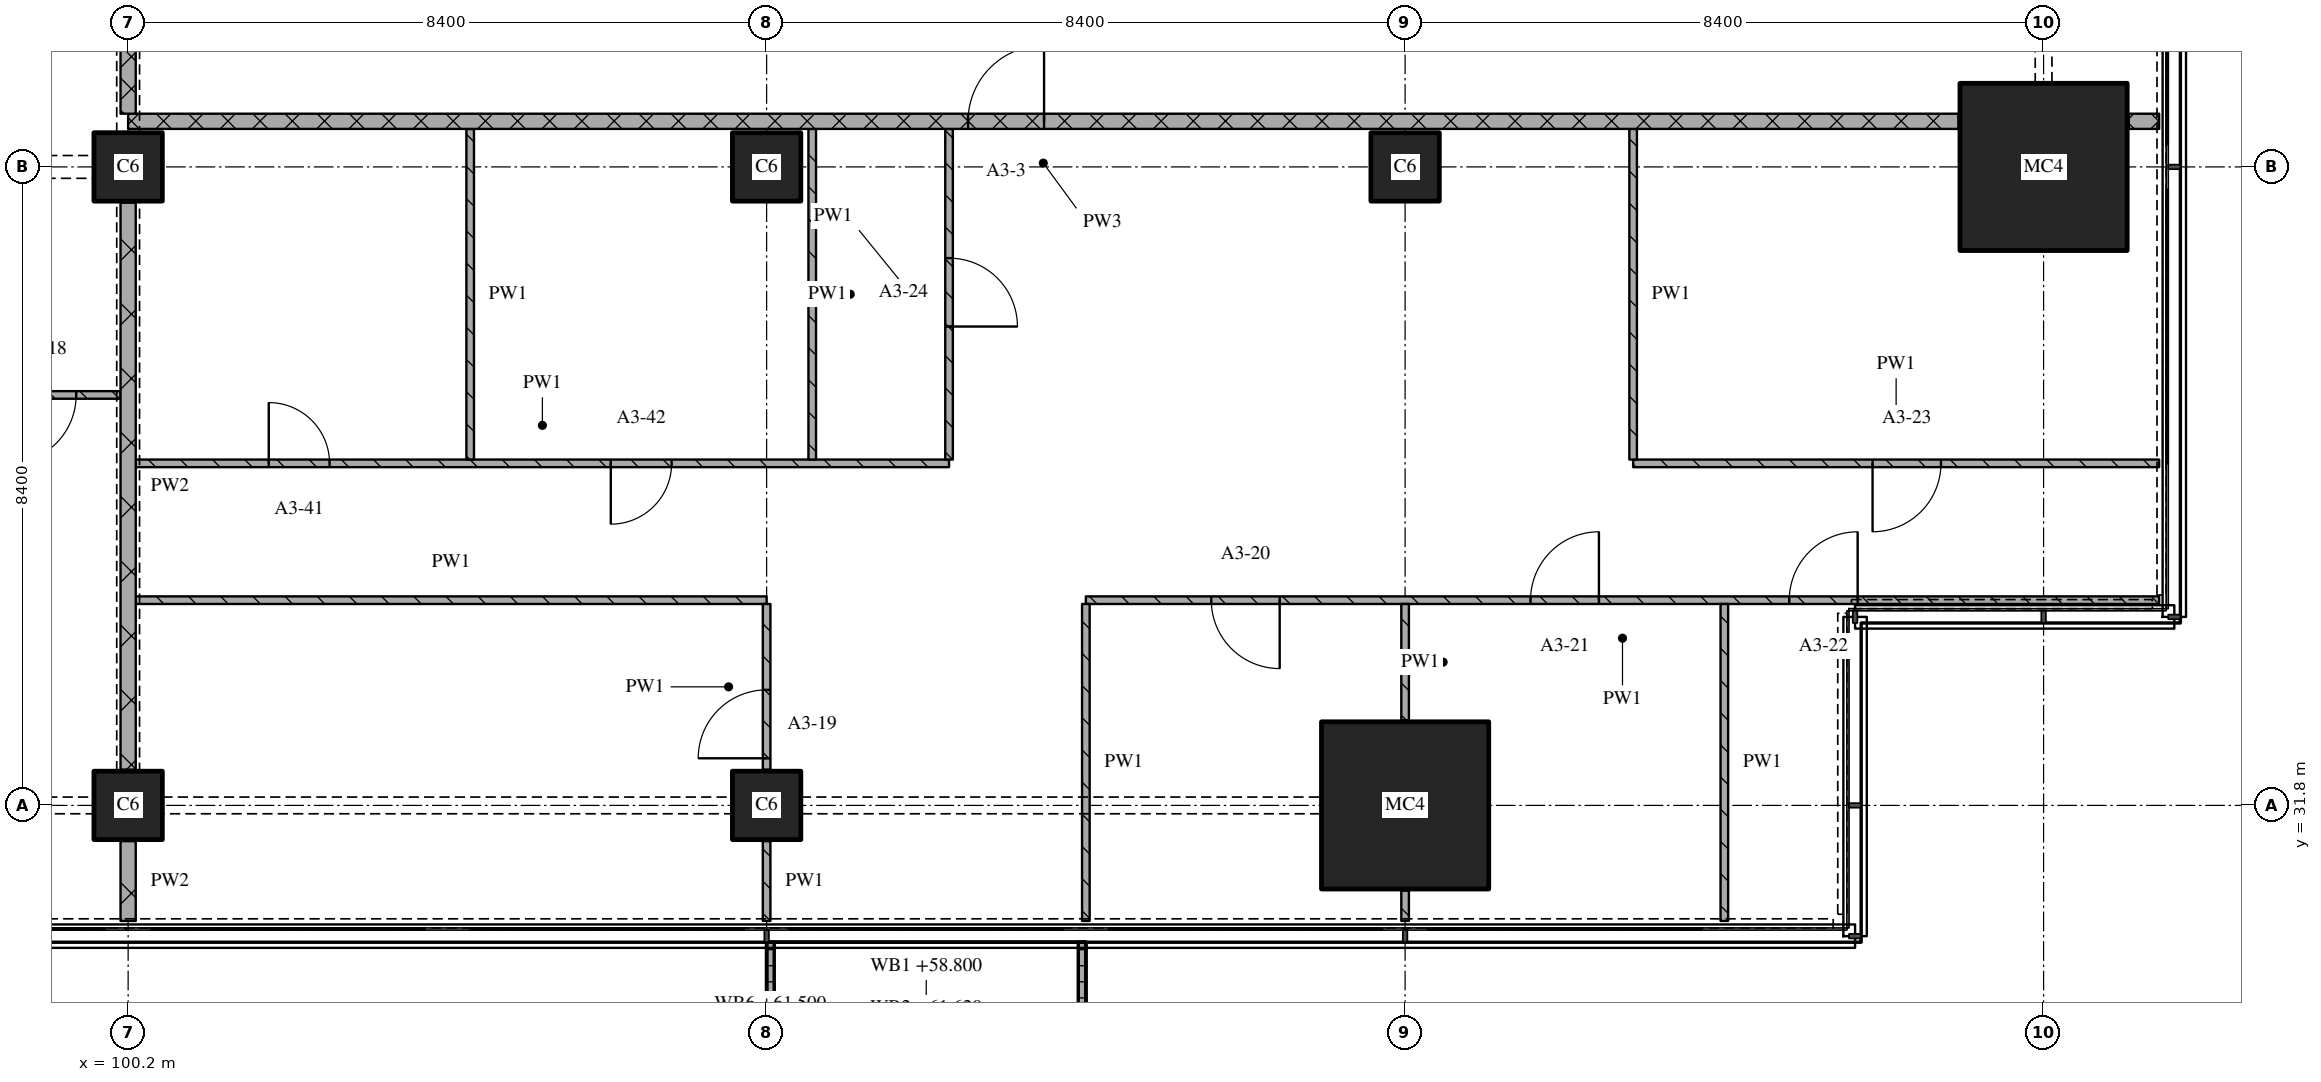
"""IFC4 building model, lengths in metres.
Left out: names, types, materials, properties, quantities, classifications, styles, units other than length and angle.
Written with IfcOpenShell. Run it as: python <this file> out.ifc"""

import sys

from ifc_helpers import new_model, si_unit, direction, frame, frame_2d, origin, origin_2d, place, context, subcontext, project, spatial, polyline, rectangle, outline, extrude, element, fill, save


model = new_model("IFC4")
c1 = context("Model", 3, precision=1e-05, world=origin(), true_north=direction((0.0, 1.0)))
c2 = subcontext(c1, "Body", "Model", "MODEL_VIEW")
j1 = project(units=[si_unit("LENGTHUNIT", "METRE"), si_unit("PLANEANGLEUNIT", "RADIAN")], contexts=[c1])
p1 = place(None, origin())
s1 = spatial("IfcSite", under=j1, at=p1, CompositionType="ELEMENT")
p2 = place(p1, origin())
s2 = spatial("IfcBuilding", under=s1, at=p2, CompositionType="ELEMENT")
p3 = place(p2, frame((0.0, 0.0, 58.8)))
s3 = spatial("IfcBuildingStorey", under=s2, at=p3, CompositionType="ELEMENT", Elevation=58.8)
for number, where, z_axis, x_axis in (
    (1, (100.2, 31.8, 0.0), (0.0, 0.0, 1.0), (1.0, 0.0, 0.0)),
    (2, (100.2, 40.2, 0.0), (0.0, 0.0, 1.0), (1.0, 0.0, 0.0)),
    (3, (108.6, 31.8, 0.0), (0.0, 0.0, 1.0), (1.0, 0.0, 0.0)),
    (4, (108.6, 40.2, 0.0), (0.0, 0.0, 1.0), (1.0, 0.0, 0.0)),
):
    element("IfcColumn", number, at=place(p3, frame(where, z_axis=z_axis, x_axis=x_axis)), inside=s3, PredefinedType="COLUMN", context=c2, shape_type="SweptSolid", body=[
        extrude(rectangle(XDim=0.9, YDim=0.9, at=origin_2d()), origin(), (0.0, 0.0, 1.0), 3.6),
    ])
p4 = place(p3, frame((117.0, 31.8, 0.0), z_axis=(0.0, 0.0, 1.0), x_axis=(1.0, 0.0, 0.0)))
e5 = element("IfcColumn", 5, at=p4, inside=s3, PredefinedType="COLUMN", context=c2, shape_type="SweptSolid", body=[
    extrude(rectangle(XDim=2.2, YDim=2.2, at=origin_2d()), origin(), (0.0, 0.0, 1.0), 3.6),
])
p5 = place(p3, frame((117.0, 40.2, 0.0), z_axis=(0.0, 0.0, 1.0), x_axis=(1.0, 0.0, 0.0)))
e6 = element("IfcColumn", 6, at=p5, inside=s3, PredefinedType="COLUMN", context=c2, shape_type="SweptSolid", body=[
    extrude(rectangle(XDim=0.9, YDim=0.9, at=origin_2d()), origin(), (0.0, 0.0, 1.0), 3.6),
])
p6 = place(p3, frame((125.4, 40.2, 0.0), z_axis=(0.0, 0.0, 1.0), x_axis=(1.0, 0.0, 0.0)))
e7 = element("IfcColumn", 7, at=p6, inside=s3, PredefinedType="COLUMN", context=c2, shape_type="SweptSolid", body=[
    extrude(rectangle(XDim=2.2, YDim=2.2, at=origin_2d()), origin(), (0.0, 0.0, 1.0), 3.6),
])
p7 = place(p3, origin())
e8 = element("IfcWall", 8, at=p7, inside=s3, PredefinedType="SOLIDWALL", context=c2, shape_type="SweptSolid", body=[
    extrude(outline(polyline([(108.6, 30.0), (108.7, 30.0), (108.7, 28.367), (112.7, 28.367), (112.7, 30.0), (112.8, 30.0), (112.8, 28.267), (108.6, 28.267), (108.6, 30.0)])), origin(), (0.0, 0.0, 1.0), 1.0),
])
p8 = place(p3, frame((100.3, 34.5, 0.0), z_axis=(0.0, 0.0, 1.0), x_axis=(1.0, 0.0, 0.0)))
e9 = element("IfcWall", 9, at=p8, inside=s3, PredefinedType="PARTITIONING", context=c2, shape_type="SweptSolid", body=[
    extrude(rectangle(XDim=8.3, YDim=0.1, at=frame_2d((4.15, 0.0))), origin(), (0.0, 0.0, 1.0), 3.32),
])
p9 = place(p3, frame((126.92, 34.5, 0.0), z_axis=(0.0, 0.0, 1.0), x_axis=(-1.0, 0.0, 0.0)))
e10 = element("IfcWall", 10, at=p9, inside=s3, PredefinedType="PARTITIONING", context=c2, shape_type="SweptSolid", body=[
    extrude(rectangle(XDim=14.12, YDim=0.1, at=frame_2d((7.06, 0.0))), origin(), (0.0, 0.0, 1.0), 3.32),
])
p10 = place(p9, frame((3.966, 0.0, 0.0)))
e11 = element("IfcOpeningElement", 11, at=p10, cuts=e10, PredefinedType="OPENING", context=c2, shape_type="SweptSolid", body=[
    extrude(rectangle(XDim=0.9, YDim=2.1, at=frame_2d((0.45, 1.05))), frame((0.0, 0.06, 0.0), z_axis=(0.0, -1.0, 0.0), x_axis=(1.0, 0.0, 0.0)), (0.0, 0.0, 1.0), 0.12),
])
p11 = place(p9, frame((7.37, 0.0, 0.0)))
e12 = element("IfcOpeningElement", 12, at=p11, cuts=e10, PredefinedType="OPENING", context=c2, shape_type="SweptSolid", body=[
    extrude(rectangle(XDim=0.9, YDim=2.1, at=frame_2d((0.45, 1.05))), frame((0.0, 0.06, 0.0), z_axis=(0.0, -1.0, 0.0), x_axis=(1.0, 0.0, 0.0)), (0.0, 0.0, 1.0), 0.12),
])
p12 = place(p9, frame((11.57, 0.0, 0.0)))
e13 = element("IfcOpeningElement", 13, at=p12, cuts=e10, PredefinedType="OPENING", context=c2, shape_type="SweptSolid", body=[
    extrude(rectangle(XDim=0.9, YDim=2.1, at=frame_2d((0.45, 1.05))), frame((0.0, 0.06, 0.0), z_axis=(0.0, -1.0, 0.0), x_axis=(1.0, 0.0, 0.0)), (0.0, 0.0, 1.0), 0.12),
])
p13 = place(p3, frame((100.3, 36.3, 0.0), z_axis=(0.0, 0.0, 1.0), x_axis=(1.0, 0.0, 0.0)))
e14 = element("IfcWall", 14, at=p13, inside=s3, PredefinedType="PARTITIONING", context=c2, shape_type="SweptSolid", body=[
    extrude(rectangle(XDim=10.7, YDim=0.1, at=frame_2d((5.35, 0.0))), origin(), (0.0, 0.0, 1.0), 3.32),
])
p14 = place(p13, frame((1.75, 0.0, 0.0)))
e15 = element("IfcOpeningElement", 15, at=p14, cuts=e14, PredefinedType="OPENING", context=c2, shape_type="SweptSolid", body=[
    extrude(rectangle(XDim=0.8, YDim=2.1, at=frame_2d((0.4, 1.05))), frame((0.0, 0.06, 0.0), z_axis=(0.0, -1.0, 0.0), x_axis=(1.0, 0.0, 0.0)), (0.0, 0.0, 1.0), 0.12),
])
p15 = place(p13, frame((6.25, 0.0, 0.0)))
e16 = element("IfcOpeningElement", 16, at=p15, cuts=e14, PredefinedType="OPENING", context=c2, shape_type="SweptSolid", body=[
    extrude(rectangle(XDim=0.8, YDim=2.1, at=frame_2d((0.4, 1.05))), frame((0.0, 0.06, 0.0), z_axis=(0.0, -1.0, 0.0), x_axis=(1.0, 0.0, 0.0)), (0.0, 0.0, 1.0), 0.12),
])
p16 = place(p3, frame((120.0, 36.3, 0.0), z_axis=(0.0, 0.0, 1.0), x_axis=(1.0, 0.0, 0.0)))
e17 = element("IfcWall", 17, at=p16, inside=s3, PredefinedType="PARTITIONING", context=c2, shape_type="SweptSolid", body=[
    extrude(rectangle(XDim=6.92, YDim=0.1, at=frame_2d((3.46, 0.0))), origin(), (0.0, 0.0, 1.0), 3.32),
])
p17 = place(p16, frame((3.15, 0.0, 0.0)))
e18 = element("IfcOpeningElement", 18, at=p17, cuts=e17, PredefinedType="OPENING", context=c2, shape_type="SweptSolid", body=[
    extrude(rectangle(XDim=0.9, YDim=2.1, at=frame_2d((0.45, 1.05))), frame((0.0, 0.06, 0.0), z_axis=(0.0, -1.0, 0.0), x_axis=(1.0, 0.0, 0.0)), (0.0, 0.0, 1.0), 0.12),
])
p18 = place(p3, frame((89.1, 37.2, 0.0), z_axis=(0.0, 0.0, 1.0), x_axis=(1.0, 0.0, 0.0)))
e19 = element("IfcWall", 19, at=p18, inside=s3, PredefinedType="PARTITIONING", context=c2, shape_type="SweptSolid", body=[
    extrude(rectangle(XDim=11.0, YDim=0.1, at=frame_2d((5.5, 0.0))), origin(), (0.0, 0.0, 1.0), 3.32),
])
p19 = place(p18, frame((6.225, 0.0, 0.0)))
e20 = element("IfcOpeningElement", 20, at=p19, cuts=e19, PredefinedType="OPENING", context=c2, shape_type="SweptSolid", body=[
    extrude(rectangle(XDim=0.8, YDim=2.1, at=frame_2d((0.4, 1.05))), frame((0.0, 0.06, 0.0), z_axis=(0.0, -1.0, 0.0), x_axis=(1.0, 0.0, 0.0)), (0.0, 0.0, 1.0), 0.12),
])
p20 = place(p18, frame((9.517, 0.0, 0.0)))
e21 = element("IfcOpeningElement", 21, at=p20, cuts=e19, PredefinedType="OPENING", context=c2, shape_type="SweptSolid", body=[
    extrude(rectangle(XDim=0.9, YDim=2.1, at=frame_2d((0.45, 1.05))), frame((0.0, 0.06, 0.0), z_axis=(0.0, -1.0, 0.0), x_axis=(1.0, 0.0, 0.0)), (0.0, 0.0, 1.0), 0.12),
])
p21 = place(p3, frame((124.28, 40.8, 0.0), z_axis=(0.0, 0.0, 1.0), x_axis=(-1.0, 0.0, 0.0)))
e22 = element("IfcWall", 22, at=p21, inside=s3, PredefinedType="PARTITIONING", context=c2, shape_type="SweptSolid", body=[
    extrude(rectangle(XDim=24.08, YDim=0.2, at=frame_2d((12.04, 0.0))), origin(), (0.0, 0.0, 1.0), 3.32),
])
p22 = place(p21, frame((12.03, 0.0, 0.0)))
e23 = element("IfcOpeningElement", 23, at=p22, cuts=e22, PredefinedType="OPENING", context=c2, shape_type="SweptSolid", body=[
    extrude(rectangle(XDim=1.0, YDim=2.1, at=frame_2d((0.5, 1.05))), frame((0.0, 0.11, 0.0), z_axis=(0.0, -1.0, 0.0), x_axis=(1.0, 0.0, 0.0)), (0.0, 0.0, 1.0), 0.22),
])
p23 = place(p3, frame((126.52, 40.8, 0.0), z_axis=(0.0, 0.0, 1.0), x_axis=(1.0, 0.0, 0.0)))
e24 = element("IfcWall", 24, at=p23, inside=s3, PredefinedType="PARTITIONING", context=c2, shape_type="SweptSolid", body=[
    extrude(rectangle(XDim=0.4, YDim=0.2, at=frame_2d((0.2, 0.0))), origin(), (0.0, 0.0, 1.0), 3.32),
])
p24 = place(p3, frame((100.2, 43.1, 0.0), z_axis=(0.0, 0.0, 1.0), x_axis=(0.0, -1.0, 0.0)))
e25 = element("IfcWall", 25, at=p24, inside=s3, PredefinedType="PARTITIONING", context=c2, shape_type="SweptSolid", body=[
    extrude(rectangle(XDim=2.2, YDim=0.2, at=frame_2d((1.1, 0.0))), origin(), (0.0, 0.0, 1.0), 2.43),
])
p25 = place(p3, frame((100.2, 31.33, 0.0), z_axis=(0.0, 0.0, 1.0), x_axis=(0.0, -1.0, 0.0)))
e26 = element("IfcWall", 26, at=p25, inside=s3, PredefinedType="PARTITIONING", context=c2, shape_type="SweptSolid", body=[
    extrude(rectangle(XDim=1.05, YDim=0.2, at=frame_2d((0.525, 0.0))), origin(), (0.0, 0.0, 1.0), 3.32),
])
p26 = place(p3, frame((100.2, 39.73, 0.0), z_axis=(0.0, 0.0, 1.0), x_axis=(0.0, -1.0, 0.0)))
e27 = element("IfcWall", 27, at=p26, inside=s3, PredefinedType="PARTITIONING", context=c2, shape_type="SweptSolid", body=[
    extrude(rectangle(XDim=7.46, YDim=0.2, at=frame_2d((3.73, 0.0))), origin(), (0.0, 0.0, 1.0), 2.83),
])
p27 = place(p3, frame((104.7, 40.7, 0.0), z_axis=(0.0, 0.0, 1.0), x_axis=(0.0, -1.0, 0.0)))
e28 = element("IfcWall", 28, at=p27, inside=s3, PredefinedType="PARTITIONING", context=c2, shape_type="SweptSolid", body=[
    extrude(rectangle(XDim=4.35, YDim=0.1, at=frame_2d((2.175, 0.0))), origin(), (0.0, 0.0, 1.0), 3.32),
])
p28 = place(p3, frame((108.6, 31.33, 0.0), z_axis=(0.0, 0.0, 1.0), x_axis=(0.0, -1.0, 0.0)))
e29 = element("IfcWall", 29, at=p28, inside=s3, PredefinedType="PARTITIONING", context=c2, shape_type="SweptSolid", body=[
    extrude(rectangle(XDim=1.05, YDim=0.1, at=frame_2d((0.525, 0.0))), origin(), (0.0, 0.0, 1.0), 3.32),
])
p29 = place(p3, frame((108.6, 32.27, 0.0), z_axis=(0.0, 0.0, 1.0), x_axis=(0.0, 1.0, 0.0)))
e30 = element("IfcWall", 30, at=p29, inside=s3, PredefinedType="PARTITIONING", context=c2, shape_type="SweptSolid", body=[
    extrude(rectangle(XDim=2.18, YDim=0.1, at=frame_2d((1.09, 0.0))), origin(), (0.0, 0.0, 1.0), 3.32),
])
p30 = place(p29, frame((0.15, 0.0, 0.0)))
e31 = element("IfcOpeningElement", 31, at=p30, cuts=e30, PredefinedType="OPENING", context=c2, shape_type="SweptSolid", body=[
    extrude(rectangle(XDim=0.9, YDim=2.1, at=frame_2d((0.45, 1.05))), frame((0.0, 0.06, 0.0), z_axis=(0.0, -1.0, 0.0), x_axis=(1.0, 0.0, 0.0)), (0.0, 0.0, 1.0), 0.12),
])
p31 = place(p3, frame((109.2, 40.7, 0.0), z_axis=(0.0, 0.0, 1.0), x_axis=(0.0, -1.0, 0.0)))
e32 = element("IfcWall", 32, at=p31, inside=s3, PredefinedType="PARTITIONING", context=c2, shape_type="SweptSolid", body=[
    extrude(rectangle(XDim=4.35, YDim=0.1, at=frame_2d((2.175, 0.0))), origin(), (0.0, 0.0, 1.0), 3.32),
])
p32 = place(p3, frame((111.0, 36.35, 0.0), z_axis=(0.0, 0.0, 1.0), x_axis=(0.0, 1.0, 0.0)))
e33 = element("IfcWall", 33, at=p32, inside=s3, PredefinedType="PARTITIONING", context=c2, shape_type="SweptSolid", body=[
    extrude(rectangle(XDim=4.35, YDim=0.1, at=frame_2d((2.175, 0.0))), origin(), (0.0, 0.0, 1.0), 3.32),
])
p33 = place(p32, frame((1.75, 0.0, 0.0)))
e34 = element("IfcOpeningElement", 34, at=p33, cuts=e33, PredefinedType="OPENING", context=c2, shape_type="SweptSolid", body=[
    extrude(rectangle(XDim=0.9, YDim=2.1, at=frame_2d((0.45, 1.05))), frame((0.0, 0.06, 0.0), z_axis=(0.0, -1.0, 0.0), x_axis=(1.0, 0.0, 0.0)), (0.0, 0.0, 1.0), 0.12),
])
p34 = place(p3, frame((112.8, 34.45, 0.0), z_axis=(0.0, 0.0, 1.0), x_axis=(0.0, -1.0, 0.0)))
e35 = element("IfcWall", 35, at=p34, inside=s3, PredefinedType="PARTITIONING", context=c2, shape_type="SweptSolid", body=[
    extrude(rectangle(XDim=4.17, YDim=0.1, at=frame_2d((2.085, 0.0))), origin(), (0.0, 0.0, 1.0), 3.32),
])
p35 = place(p3, frame((117.0, 30.68, 0.0), z_axis=(0.0, 0.0, 1.0), x_axis=(0.0, -1.0, 0.0)))
e36 = element("IfcWall", 36, at=p35, inside=s3, PredefinedType="PARTITIONING", context=c2, shape_type="SweptSolid", body=[
    extrude(rectangle(XDim=0.4, YDim=0.1, at=frame_2d((0.2, 0.0))), origin(), (0.0, 0.0, 1.0), 3.32),
])
p36 = place(p3, frame((117.0, 34.45, 0.0), z_axis=(0.0, 0.0, 1.0), x_axis=(0.0, -1.0, 0.0)))
e37 = element("IfcWall", 37, at=p36, inside=s3, PredefinedType="PARTITIONING", context=c2, shape_type="SweptSolid", body=[
    extrude(rectangle(XDim=1.53, YDim=0.1, at=frame_2d((0.765, 0.0))), origin(), (0.0, 0.0, 1.0), 3.32),
])
p37 = place(p3, frame((120.0, 40.7, 0.0), z_axis=(0.0, 0.0, 1.0), x_axis=(0.0, -1.0, 0.0)))
e38 = element("IfcWall", 38, at=p37, inside=s3, PredefinedType="PARTITIONING", context=c2, shape_type="SweptSolid", body=[
    extrude(rectangle(XDim=4.35, YDim=0.1, at=frame_2d((2.175, 0.0))), origin(), (0.0, 0.0, 1.0), 3.32),
])
p38 = place(p3, frame((121.2, 34.45, 0.0), z_axis=(0.0, 0.0, 1.0), x_axis=(0.0, -1.0, 0.0)))
e39 = element("IfcWall", 39, at=p38, inside=s3, PredefinedType="PARTITIONING", context=c2, shape_type="SweptSolid", body=[
    extrude(rectangle(XDim=4.17, YDim=0.1, at=frame_2d((2.085, 0.0))), origin(), (0.0, 0.0, 1.0), 3.32),
])
p39 = place(p10, origin())
e40 = element("IfcDoor", 40, at=p39, inside=s3, OperationType="SINGLE_SWING_RIGHT", PredefinedType="DOOR", context=c2, shape_type="SweptSolid", body=[
    extrude(rectangle(XDim=0.9, YDim=2.1, at=frame_2d((0.45, 1.05))), frame((0.0, 0.025, 0.0), z_axis=(0.0, -1.0, 0.0), x_axis=(1.0, 0.0, 0.0)), (0.0, 0.0, 1.0), 0.05),
])
fill(e11, e40)
p40 = place(p11, origin())
e41 = element("IfcDoor", 41, at=p40, inside=s3, OperationType="SINGLE_SWING_RIGHT", PredefinedType="DOOR", context=c2, shape_type="SweptSolid", body=[
    extrude(rectangle(XDim=0.9, YDim=2.1, at=frame_2d((0.45, 1.05))), frame((0.0, 0.025, 0.0), z_axis=(0.0, -1.0, 0.0), x_axis=(1.0, 0.0, 0.0)), (0.0, 0.0, 1.0), 0.05),
])
fill(e12, e41)
p41 = place(p12, origin())
e42 = element("IfcDoor", 42, at=p41, inside=s3, OperationType="SINGLE_SWING_LEFT", PredefinedType="DOOR", context=c2, shape_type="SweptSolid", body=[
    extrude(rectangle(XDim=0.9, YDim=2.1, at=frame_2d((0.45, 1.05))), frame((0.0, 0.025, 0.0), z_axis=(0.0, -1.0, 0.0), x_axis=(1.0, 0.0, 0.0)), (0.0, 0.0, 1.0), 0.05),
])
fill(e13, e42)
p42 = place(p14, origin())
e43 = element("IfcDoor", 43, at=p42, inside=s3, OperationType="SINGLE_SWING_LEFT", PredefinedType="DOOR", context=c2, shape_type="SweptSolid", body=[
    extrude(rectangle(XDim=0.8, YDim=2.1, at=frame_2d((0.4, 1.05))), frame((0.0, 0.025, 0.0), z_axis=(0.0, -1.0, 0.0), x_axis=(1.0, 0.0, 0.0)), (0.0, 0.0, 1.0), 0.05),
])
fill(e15, e43)
p43 = place(p15, origin())
e44 = element("IfcDoor", 44, at=p43, inside=s3, OperationType="SINGLE_SWING_RIGHT", PredefinedType="DOOR", context=c2, shape_type="SweptSolid", body=[
    extrude(rectangle(XDim=0.8, YDim=2.1, at=frame_2d((0.4, 1.05))), frame((0.0, 0.025, 0.0), z_axis=(0.0, -1.0, 0.0), x_axis=(1.0, 0.0, 0.0)), (0.0, 0.0, 1.0), 0.05),
])
fill(e16, e44)
p44 = place(p17, origin())
e45 = element("IfcDoor", 45, at=p44, inside=s3, OperationType="SINGLE_SWING_RIGHT", PredefinedType="DOOR", context=c2, shape_type="SweptSolid", body=[
    extrude(rectangle(XDim=0.9, YDim=2.1, at=frame_2d((0.45, 1.05))), frame((0.0, 0.025, 0.0), z_axis=(0.0, -1.0, 0.0), x_axis=(1.0, 0.0, 0.0)), (0.0, 0.0, 1.0), 0.05),
])
fill(e18, e45)
p45 = place(p20, origin())
e46 = element("IfcDoor", 46, at=p45, inside=s3, OperationType="SINGLE_SWING_RIGHT", PredefinedType="DOOR", context=c2, shape_type="SweptSolid", body=[
    extrude(rectangle(XDim=0.9, YDim=2.1, at=frame_2d((0.45, 1.05))), frame((0.0, 0.025, 0.0), z_axis=(0.0, -1.0, 0.0), x_axis=(1.0, 0.0, 0.0)), (0.0, 0.0, 1.0), 0.05),
])
fill(e21, e46)
p46 = place(p22, origin())
e47 = element("IfcDoor", 47, at=p46, inside=s3, OperationType="SINGLE_SWING_RIGHT", PredefinedType="DOOR", context=c2, shape_type="SweptSolid", body=[
    extrude(rectangle(XDim=1.0, YDim=2.1, at=frame_2d((0.5, 1.05))), frame((0.0, 0.025, 0.0), z_axis=(0.0, -1.0, 0.0), x_axis=(1.0, 0.0, 0.0)), (0.0, 0.0, 1.0), 0.05),
])
fill(e23, e47)
p47 = place(p30, origin())
e48 = element("IfcDoor", 48, at=p47, inside=s3, OperationType="SINGLE_SWING_LEFT", PredefinedType="DOOR", context=c2, shape_type="SweptSolid", body=[
    extrude(rectangle(XDim=0.9, YDim=2.1, at=frame_2d((0.45, 1.05))), frame((0.0, 0.025, 0.0), z_axis=(0.0, -1.0, 0.0), x_axis=(1.0, 0.0, 0.0)), (0.0, 0.0, 1.0), 0.05),
])
fill(e31, e48)
p48 = place(p33, origin())
e49 = element("IfcDoor", 49, at=p48, inside=s3, OperationType="SINGLE_SWING_RIGHT", PredefinedType="DOOR", context=c2, shape_type="SweptSolid", body=[
    extrude(rectangle(XDim=0.9, YDim=2.1, at=frame_2d((0.45, 1.05))), frame((0.0, 0.025, 0.0), z_axis=(0.0, -1.0, 0.0), x_axis=(1.0, 0.0, 0.0)), (0.0, 0.0, 1.0), 0.05),
])
fill(e34, e49)
save(model, sys.argv[1])
